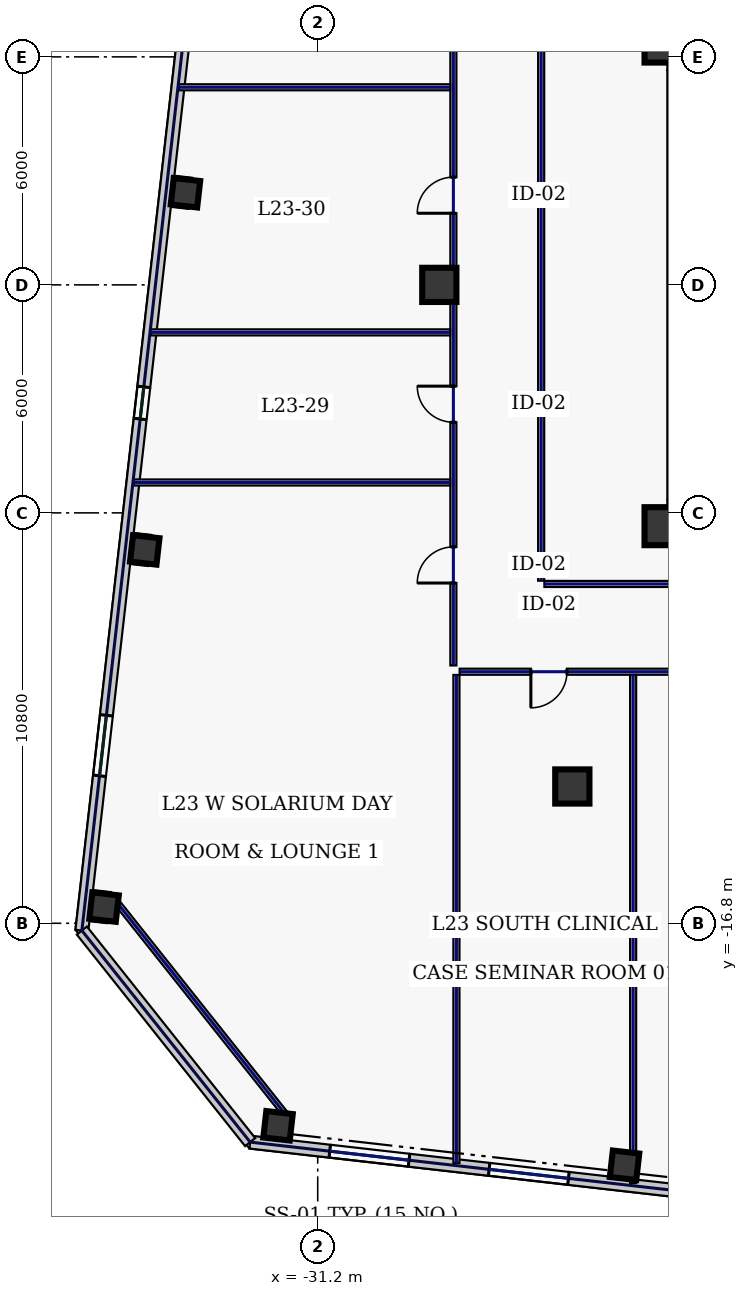
"""IFC4 building model, lengths in metres.
Left out: names, types, materials, properties, quantities, classifications, styles, units other than length and angle.
Written with IfcOpenShell. Run it as: python <this file> out.ifc"""

import sys

from ifc_helpers import new_model, si_unit, direction, frame, frame_2d, origin, origin_2d, place, context, subcontext, project, spatial, rectangle, hollow_rectangle, extrude, element, fill, save


model = new_model("IFC4")
c1 = context("Model", 3, precision=1e-05, world=origin(), true_north=direction((0.0, 1.0)))
c2 = subcontext(c1, "Body", "Model", "MODEL_VIEW")
j1 = project(units=[si_unit("LENGTHUNIT", "METRE"), si_unit("PLANEANGLEUNIT", "RADIAN")], contexts=[c1])
p1 = place(None, origin())
s1 = spatial("IfcSite", under=j1, at=p1, CompositionType="ELEMENT")
p2 = place(p1, origin())
s2 = spatial("IfcBuilding", under=s1, at=p2, CompositionType="ELEMENT")
p3 = place(p2, frame((0.0, 0.0, 105.4)))
s3 = spatial("IfcBuildingStorey", under=s2, at=p3, CompositionType="ELEMENT", Elevation=105.4)
for number, where, z_axis, x_axis in (
    (1, (-22.0, 6.0, 0.0), (0.0, 0.0, 1.0), (1.0, 0.0, 0.0)),
    (2, (-22.0, -6.0, 0.0), (0.0, 0.0, 1.0), (1.0, 0.0, 0.0)),
):
    element("IfcWall", number, at=place(p3, frame(where, z_axis=z_axis, x_axis=x_axis)), inside=s3, PredefinedType="SHEAR", context=c2, shape_type="SweptSolid", body=[
        extrude(rectangle(XDim=11.55, YDim=0.7, at=frame_2d((5.775, 0.0))), origin(), (0.0, 0.0, 1.0), 3.74),
    ])
p4 = place(p3, frame((-21.6, -5.65, 0.0), z_axis=(0.0, 0.0, 1.0), x_axis=(0.0, 1.0, 0.0)))
e3 = element("IfcWall", 3, at=p4, inside=s3, PredefinedType="SHEAR", context=c2, shape_type="SweptSolid", body=[
    extrude(rectangle(XDim=11.3, YDim=0.8, at=frame_2d((5.65, 0.0))), origin(), (0.0, 0.0, 1.0), 3.74),
])
for number, where, z_axis, x_axis in (
    (4, (-22.1, -6.35, 0.0), (0.0, 0.0, 1.0), (1.0, 0.0, 0.0)),
    (5, (-22.1, 6.35, 0.0), (0.0, 0.0, 1.0), (1.0, 0.0, 0.0)),
):
    element("IfcColumn", number, at=place(p3, frame(where, z_axis=z_axis, x_axis=x_axis)), inside=s3, PredefinedType="COLUMN", context=c2, shape_type="SweptSolid", body=[
        extrude(hollow_rectangle(XDim=1.0, YDim=1.0, WallThickness=0.045, at=origin_2d()), origin(), (0.0, 0.0, 1.0), 3.74),
    ])
for number, where, z_axis, x_axis in (
    (6, (-24.5, -13.2, 0.0), (0.0, 0.0, 1.0), (1.0, 0.0, 0.0)),
    (7, (-28.0, 0.0, 0.0), (0.0, 0.0, 1.0), (1.0, 0.0, 0.0)),
):
    element("IfcColumn", number, at=place(p3, frame(where, z_axis=z_axis, x_axis=x_axis)), inside=s3, PredefinedType="COLUMN", context=c2, shape_type="SweptSolid", body=[
        extrude(hollow_rectangle(XDim=0.9, YDim=0.9, WallThickness=0.04, at=origin_2d()), origin(), (0.0, 0.0, 1.0), 3.74),
    ])
for number, where, z_axis, x_axis in (
    (8, (-32.244, -22.129, 0.0), (0.0, 0.0, 1.0), (0.994, -0.113, 0.0)),
    (9, (-23.126, -23.168, 0.0), (0.0, 0.0, 1.0), (0.994, -0.113, 0.0)),
    (10, (-34.68, 2.425, 0.0), (0.0, 0.0, 1.0), (0.994, -0.113, 0.0)),
    (11, (-35.751, -6.974, 0.0), (0.0, 0.0, 1.0), (0.994, -0.113, 0.0)),
    (12, (-36.822, -16.374, 0.0), (0.0, 0.0, 1.0), (0.994, -0.113, 0.0)),
):
    element("IfcColumn", number, at=place(p3, frame(where, z_axis=z_axis, x_axis=x_axis)), inside=s3, PredefinedType="COLUMN", context=c2, shape_type="SweptSolid", body=[
        extrude(hollow_rectangle(XDim=0.7, YDim=0.7, WallThickness=0.032, at=origin_2d()), origin(), (0.0, 0.0, 1.0), 3.74),
    ])
p5 = place(p3, frame((-32.977, -22.559, 0.0), z_axis=(0.0, 0.0, 1.0), x_axis=(0.993571214605, -0.113208840243, 0.0)))
e13 = element("IfcWall", 13, at=p5, inside=s3, PredefinedType="STANDARD", context=c2, shape_type="SweptSolid", body=[
    extrude(rectangle(XDim=21.223, YDim=0.34, at=frame_2d((10.611, 0.0))), origin(), (0.0, 0.0, 1.0), 3.74),
])
p6 = place(p5, frame((2.108, 0.0, 0.67)))
e14 = element("IfcOpeningElement", 14, at=p6, cuts=e13, PredefinedType="OPENING", context=c2, shape_type="SweptSolid", body=[
    extrude(rectangle(XDim=2.1, YDim=2.2, at=frame_2d((1.05, 1.1))), frame((0.0, 0.18, 0.0), z_axis=(0.0, -1.0, 0.0), x_axis=(1.0, 0.0, 0.0)), (0.0, 0.0, 1.0), 0.36),
])
p7 = place(p5, frame((6.329, 0.0, 0.67)))
e15 = element("IfcOpeningElement", 15, at=p7, cuts=e13, PredefinedType="OPENING", context=c2, shape_type="SweptSolid", body=[
    extrude(rectangle(XDim=2.1, YDim=2.2, at=frame_2d((1.05, 1.1))), frame((0.0, 0.18, 0.0), z_axis=(0.0, -1.0, 0.0), x_axis=(1.0, 0.0, 0.0)), (0.0, 0.0, 1.0), 0.36),
])
p8 = place(p5, frame((11.285, 0.0, 0.67)))
e16 = element("IfcOpeningElement", 16, at=p8, cuts=e13, PredefinedType="OPENING", context=c2, shape_type="SweptSolid", body=[
    extrude(rectangle(XDim=2.1, YDim=2.2, at=frame_2d((1.05, 1.1))), frame((0.0, 0.18, 0.0), z_axis=(0.0, -1.0, 0.0), x_axis=(1.0, 0.0, 0.0)), (0.0, 0.0, 1.0), 0.36),
])
p9 = place(p5, frame((15.506, 0.0, 0.67)))
e17 = element("IfcOpeningElement", 17, at=p9, cuts=e13, PredefinedType="OPENING", context=c2, shape_type="SweptSolid", body=[
    extrude(rectangle(XDim=0.85, YDim=1.85, at=frame_2d((0.425, 0.925))), frame((0.0, 0.18, 0.0), z_axis=(0.0, -1.0, 0.0), x_axis=(1.0, 0.0, 0.0)), (0.0, 0.0, 1.0), 0.36),
])
p10 = place(p3, frame((-32.968, 21.957, 0.0), z_axis=(0.0, 0.0, 1.0), x_axis=(-0.113201605824, -0.993572038877, 0.0)))
e18 = element("IfcWall", 18, at=p10, inside=s3, PredefinedType="STANDARD", context=c2, shape_type="SweptSolid", body=[
    extrude(rectangle(XDim=39.2, YDim=0.34, at=frame_2d((19.6, 0.0))), origin(), (0.0, 0.0, 1.0), 3.74),
])
p11 = place(p10, frame((4.1, 0.0, 0.58)))
e19 = element("IfcOpeningElement", 19, at=p11, cuts=e18, PredefinedType="OPENING", context=c2, shape_type="SweptSolid", body=[
    extrude(rectangle(XDim=1.6, YDim=2.3, at=frame_2d((0.8, 1.15))), frame((0.0, 0.18, 0.0), z_axis=(0.0, -1.0, 0.0), x_axis=(1.0, 0.0, 0.0)), (0.0, 0.0, 1.0), 0.36),
])
p12 = place(p10, frame((13.9, 0.0, 0.58)))
e20 = element("IfcOpeningElement", 20, at=p12, cuts=e18, PredefinedType="OPENING", context=c2, shape_type="SweptSolid", body=[
    extrude(rectangle(XDim=1.6, YDim=2.3, at=frame_2d((0.8, 1.15))), frame((0.0, 0.18, 0.0), z_axis=(0.0, -1.0, 0.0), x_axis=(1.0, 0.0, 0.0)), (0.0, 0.0, 1.0), 0.36),
])
p13 = place(p10, frame((24.8, 0.0, 0.75)))
e21 = element("IfcOpeningElement", 21, at=p13, cuts=e18, PredefinedType="OPENING", context=c2, shape_type="SweptSolid", body=[
    extrude(rectangle(XDim=0.85, YDim=1.85, at=frame_2d((0.425, 0.925))), frame((0.0, 0.18, 0.0), z_axis=(0.0, -1.0, 0.0), x_axis=(1.0, 0.0, 0.0)), (0.0, 0.0, 1.0), 0.36),
])
p14 = place(p10, frame((33.5, 0.0, 0.58)))
e22 = element("IfcOpeningElement", 22, at=p14, cuts=e18, PredefinedType="OPENING", context=c2, shape_type="SweptSolid", body=[
    extrude(rectangle(XDim=1.6, YDim=2.3, at=frame_2d((0.8, 1.15))), frame((0.0, 0.18, 0.0), z_axis=(0.0, -1.0, 0.0), x_axis=(1.0, 0.0, 0.0)), (0.0, 0.0, 1.0), 0.36),
])
p15 = place(p3, frame((-37.406, -16.991, 0.0), z_axis=(0.0, 0.0, 1.0), x_axis=(0.622507800567, -0.78261359446, 0.0)))
e23 = element("IfcWall", 23, at=p15, inside=s3, PredefinedType="STANDARD", context=c2, shape_type="SweptSolid", body=[
    extrude(rectangle(XDim=7.114, YDim=0.34, at=frame_2d((3.557, 0.0))), origin(), (0.0, 0.0, 1.0), 3.74),
])
p16 = place(p3, frame((-36.556, -16.162, 0.0), z_axis=(0.0, 0.0, 1.0), x_axis=(0.622522641622, -0.782601789334, 0.0)))
e24 = element("IfcWall", 24, at=p16, inside=s3, PredefinedType="PARTITIONING", context=c2, shape_type="SweptSolid", body=[
    extrude(rectangle(XDim=7.354, YDim=0.16, at=frame_2d((3.677, 0.0))), origin(), (0.0, 0.0, 1.0), 3.74),
])
p17 = place(p3, frame((-27.63, -10.015, 0.0), z_axis=(0.0, 0.0, 1.0), x_axis=(0.0, 1.0, 0.0)))
e25 = element("IfcWall", 25, at=p17, inside=s3, PredefinedType="PARTITIONING", context=c2, shape_type="SweptSolid", body=[
    extrude(rectangle(XDim=20.13, YDim=0.16, at=frame_2d((10.065, 0.0))), origin(), (0.0, 0.0, 1.0), 3.74),
])
p18 = place(p17, frame((2.169, 0.0, 0.0)))
e26 = element("IfcOpeningElement", 26, at=p18, cuts=e25, PredefinedType="OPENING", context=c2, shape_type="SweptSolid", body=[
    extrude(rectangle(XDim=0.95, YDim=2.2, at=frame_2d((0.475, 1.1))), frame((0.0, 0.09, 0.0), z_axis=(0.0, -1.0, 0.0), x_axis=(1.0, 0.0, 0.0)), (0.0, 0.0, 1.0), 0.18),
])
p19 = place(p17, frame((6.4, 0.0, 0.0)))
e27 = element("IfcOpeningElement", 27, at=p19, cuts=e25, PredefinedType="OPENING", context=c2, shape_type="SweptSolid", body=[
    extrude(rectangle(XDim=0.95, YDim=2.2, at=frame_2d((0.475, 1.1))), frame((0.0, 0.09, 0.0), z_axis=(0.0, -1.0, 0.0), x_axis=(1.0, 0.0, 0.0)), (0.0, 0.0, 1.0), 0.18),
])
p20 = place(p17, frame((11.9, 0.0, 0.0)))
e28 = element("IfcOpeningElement", 28, at=p20, cuts=e25, PredefinedType="OPENING", context=c2, shape_type="SweptSolid", body=[
    extrude(rectangle(XDim=0.95, YDim=2.2, at=frame_2d((0.475, 1.1))), frame((0.0, 0.09, 0.0), z_axis=(0.0, -1.0, 0.0), x_axis=(1.0, 0.0, 0.0)), (0.0, 0.0, 1.0), 0.18),
])
p21 = place(p17, frame((17.131, 0.0, 0.0)))
e29 = element("IfcOpeningElement", 29, at=p21, cuts=e25, PredefinedType="OPENING", context=c2, shape_type="SweptSolid", body=[
    extrude(rectangle(XDim=0.95, YDim=2.2, at=frame_2d((0.475, 1.1))), frame((0.0, 0.09, 0.0), z_axis=(0.0, -1.0, 0.0), x_axis=(1.0, 0.0, 0.0)), (0.0, 0.0, 1.0), 0.18),
])
p22 = place(p3, frame((27.465, -10.18, 0.0), z_axis=(0.0, 0.0, 1.0), x_axis=(-1.0, 0.0, 0.0)))
e30 = element("IfcWall", 30, at=p22, inside=s3, PredefinedType="PARTITIONING", context=c2, shape_type="SweptSolid", body=[
    extrude(rectangle(XDim=54.93, YDim=0.16, at=frame_2d((27.465, 0.0))), origin(), (0.0, 0.0, 1.0), 3.74),
])
p23 = place(p22, frame((52.106, 0.0, 0.0)))
e31 = element("IfcOpeningElement", 31, at=p23, cuts=e30, PredefinedType="OPENING", context=c2, shape_type="SweptSolid", body=[
    extrude(rectangle(XDim=0.95, YDim=2.2, at=frame_2d((0.475, 1.1))), frame((0.0, 0.09, 0.0), z_axis=(0.0, -1.0, 0.0), x_axis=(1.0, 0.0, 0.0)), (0.0, 0.0, 1.0), 0.18),
])
p24 = place(p22, frame((46.575, 0.0, 0.0)))
e32 = element("IfcOpeningElement", 32, at=p24, cuts=e30, PredefinedType="OPENING", context=c2, shape_type="SweptSolid", body=[
    extrude(rectangle(XDim=1.15, YDim=2.2, at=frame_2d((0.575, 1.1))), frame((0.0, 0.09, 0.0), z_axis=(0.0, -1.0, 0.0), x_axis=(1.0, 0.0, 0.0)), (0.0, 0.0, 1.0), 0.18),
])
p25 = place(p22, frame((40.225, 0.0, 0.0)))
e33 = element("IfcOpeningElement", 33, at=p25, cuts=e30, PredefinedType="OPENING", context=c2, shape_type="SweptSolid", body=[
    extrude(rectangle(XDim=0.95, YDim=2.2, at=frame_2d((0.475, 1.1))), frame((0.0, 0.09, 0.0), z_axis=(0.0, -1.0, 0.0), x_axis=(1.0, 0.0, 0.0)), (0.0, 0.0, 1.0), 0.18),
])
p26 = place(p22, frame((33.425, 0.0, 0.0)))
e34 = element("IfcOpeningElement", 34, at=p26, cuts=e30, PredefinedType="OPENING", context=c2, shape_type="SweptSolid", body=[
    extrude(rectangle(XDim=1.3, YDim=2.2, at=frame_2d((0.65, 1.1))), frame((0.0, 0.09, 0.0), z_axis=(0.0, -1.0, 0.0), x_axis=(1.0, 0.0, 0.0)), (0.0, 0.0, 1.0), 0.18),
])
p27 = place(p22, frame((26.525, 0.0, 0.0)))
e35 = element("IfcOpeningElement", 35, at=p27, cuts=e30, PredefinedType="OPENING", context=c2, shape_type="SweptSolid", body=[
    extrude(rectangle(XDim=1.3, YDim=2.2, at=frame_2d((0.65, 1.1))), frame((0.0, 0.09, 0.0), z_axis=(0.0, -1.0, 0.0), x_axis=(1.0, 0.0, 0.0)), (0.0, 0.0, 1.0), 0.18),
])
p28 = place(p22, frame((19.875, 0.0, 0.0)))
e36 = element("IfcOpeningElement", 36, at=p28, cuts=e30, PredefinedType="OPENING", context=c2, shape_type="SweptSolid", body=[
    extrude(rectangle(XDim=1.3, YDim=2.2, at=frame_2d((0.65, 1.1))), frame((0.0, 0.09, 0.0), z_axis=(0.0, -1.0, 0.0), x_axis=(1.0, 0.0, 0.0)), (0.0, 0.0, 1.0), 0.18),
])
p29 = place(p22, frame((13.65, 0.0, 0.0)))
e37 = element("IfcOpeningElement", 37, at=p29, cuts=e30, PredefinedType="OPENING", context=c2, shape_type="SweptSolid", body=[
    extrude(rectangle(XDim=0.95, YDim=2.2, at=frame_2d((0.475, 1.1))), frame((0.0, 0.09, 0.0), z_axis=(0.0, -1.0, 0.0), x_axis=(1.0, 0.0, 0.0)), (0.0, 0.0, 1.0), 0.18),
])
p30 = place(p22, frame((7.425, 0.0, 0.0)))
e38 = element("IfcOpeningElement", 38, at=p30, cuts=e30, PredefinedType="OPENING", context=c2, shape_type="SweptSolid", body=[
    extrude(rectangle(XDim=0.95, YDim=2.2, at=frame_2d((0.475, 1.1))), frame((0.0, 0.09, 0.0), z_axis=(0.0, -1.0, 0.0), x_axis=(1.0, 0.0, 0.0)), (0.0, 0.0, 1.0), 0.18),
])
p31 = place(p22, frame((2.044, 0.0, 0.0)))
e39 = element("IfcOpeningElement", 39, at=p31, cuts=e30, PredefinedType="OPENING", context=c2, shape_type="SweptSolid", body=[
    extrude(rectangle(XDim=1.15, YDim=2.2, at=frame_2d((0.575, 1.1))), frame((0.0, 0.09, 0.0), z_axis=(0.0, -1.0, 0.0), x_axis=(1.0, 0.0, 0.0)), (0.0, 0.0, 1.0), 0.18),
])
p32 = place(p3, frame((-25.32, 7.885, 0.0), z_axis=(0.0, 0.0, 1.0), x_axis=(0.0, -1.0, 0.0)))
e40 = element("IfcWall", 40, at=p32, inside=s3, PredefinedType="PARTITIONING", context=c2, shape_type="SweptSolid", body=[
    extrude(rectangle(XDim=15.67, YDim=0.16, at=frame_2d((7.835, 0.0))), origin(), (0.0, 0.0, 1.0), 3.74),
])
p33 = place(p3, frame((-25.235, -7.87, 0.0), z_axis=(0.0, 0.0, 1.0), x_axis=(1.0, 0.0, 0.0)))
e41 = element("IfcWall", 41, at=p33, inside=s3, PredefinedType="PARTITIONING", context=c2, shape_type="SweptSolid", body=[
    extrude(rectangle(XDim=14.57, YDim=0.16, at=frame_2d((7.285, 0.0))), origin(), (0.0, 0.0, 1.0), 3.74),
])
p34 = place(p3, frame((-27.55, -23.106, 0.0), z_axis=(0.0, 0.0, 1.0), x_axis=(0.0, 1.0, 0.0)))
e42 = element("IfcWall", 42, at=p34, inside=s3, PredefinedType="PARTITIONING", context=c2, shape_type="SweptSolid", body=[
    extrude(rectangle(XDim=12.842, YDim=0.16, at=frame_2d((6.421, 0.0))), origin(), (0.0, 0.0, 1.0), 3.74),
])
p35 = place(p3, frame((-22.9, -23.636, 0.0), z_axis=(0.0, 0.0, 1.0), x_axis=(0.0, 1.0, 0.0)))
e43 = element("IfcWall", 43, at=p35, inside=s3, PredefinedType="PARTITIONING", context=c2, shape_type="SweptSolid", body=[
    extrude(rectangle(XDim=13.371, YDim=0.16, at=frame_2d((6.686, 0.0))), origin(), (0.0, 0.0, 1.0), 3.74),
])
p36 = place(p3, frame((-36.042, -5.2, 0.0), z_axis=(0.0, 0.0, 1.0), x_axis=(1.0, 0.0, 0.0)))
e44 = element("IfcWall", 44, at=p36, inside=s3, PredefinedType="PARTITIONING", context=c2, shape_type="SweptSolid", body=[
    extrude(rectangle(XDim=8.327, YDim=0.16, at=frame_2d((4.164, 0.0))), origin(), (0.0, 0.0, 1.0), 3.74),
])
p37 = place(p3, frame((-35.592, -1.25, 0.0), z_axis=(0.0, 0.0, 1.0), x_axis=(1.0, 0.0, 0.0)))
e45 = element("IfcWall", 45, at=p37, inside=s3, PredefinedType="PARTITIONING", context=c2, shape_type="SweptSolid", body=[
    extrude(rectangle(XDim=7.877, YDim=0.16, at=frame_2d((3.938, 0.0))), origin(), (0.0, 0.0, 1.0), 3.74),
])
p38 = place(p3, frame((-34.857, 5.2, 0.0), z_axis=(0.0, 0.0, 1.0), x_axis=(1.0, 0.0, 0.0)))
e46 = element("IfcWall", 46, at=p38, inside=s3, PredefinedType="PARTITIONING", context=c2, shape_type="SweptSolid", body=[
    extrude(rectangle(XDim=7.142, YDim=0.16, at=frame_2d((3.571, 0.0))), origin(), (0.0, 0.0, 1.0), 3.74),
])
p39 = place(p6, origin())
e47 = element("IfcWindow", 47, at=p39, inside=s3, PartitioningType="SINGLE_PANEL", PredefinedType="WINDOW", context=c2, shape_type="SweptSolid", body=[
    extrude(rectangle(XDim=2.1, YDim=2.2, at=frame_2d((1.05, 1.1))), frame((0.0, 0.03, 0.0), z_axis=(0.0, -1.0, 0.0), x_axis=(1.0, 0.0, 0.0)), (0.0, 0.0, 1.0), 0.06),
])
fill(e14, e47)
p40 = place(p7, origin())
e48 = element("IfcWindow", 48, at=p40, inside=s3, PartitioningType="SINGLE_PANEL", PredefinedType="WINDOW", context=c2, shape_type="SweptSolid", body=[
    extrude(rectangle(XDim=2.1, YDim=2.2, at=frame_2d((1.05, 1.1))), frame((0.0, 0.03, 0.0), z_axis=(0.0, -1.0, 0.0), x_axis=(1.0, 0.0, 0.0)), (0.0, 0.0, 1.0), 0.06),
])
fill(e15, e48)
p41 = place(p13, origin())
e49 = element("IfcWindow", 49, at=p41, inside=s3, PartitioningType="SINGLE_PANEL", PredefinedType="WINDOW", context=c2, shape_type="SweptSolid", body=[
    extrude(rectangle(XDim=0.85, YDim=1.85, at=frame_2d((0.425, 0.925))), frame((0.0, 0.03, 0.0), z_axis=(0.0, -1.0, 0.0), x_axis=(1.0, 0.0, 0.0)), (0.0, 0.0, 1.0), 0.06),
])
fill(e21, e49)
p42 = place(p14, origin())
e50 = element("IfcWindow", 50, at=p42, inside=s3, PartitioningType="SINGLE_PANEL", PredefinedType="WINDOW", context=c2, shape_type="SweptSolid", body=[
    extrude(rectangle(XDim=1.6, YDim=2.3, at=frame_2d((0.8, 1.15))), frame((0.0, 0.03, 0.0), z_axis=(0.0, -1.0, 0.0), x_axis=(1.0, 0.0, 0.0)), (0.0, 0.0, 1.0), 0.06),
])
fill(e22, e50)
p43 = place(p23, origin())
e51 = element("IfcDoor", 51, at=p43, inside=s3, OperationType="SINGLE_SWING_RIGHT", PredefinedType="DOOR", context=c2, shape_type="SweptSolid", body=[
    extrude(rectangle(XDim=0.95, YDim=2.2, at=frame_2d((0.475, 1.1))), frame((0.0, 0.025, 0.0), z_axis=(0.0, -1.0, 0.0), x_axis=(1.0, 0.0, 0.0)), (0.0, 0.0, 1.0), 0.05),
])
fill(e31, e51)
p44 = place(p18, origin())
e52 = element("IfcDoor", 52, at=p44, inside=s3, OperationType="SINGLE_SWING_LEFT", PredefinedType="DOOR", context=c2, shape_type="SweptSolid", body=[
    extrude(rectangle(XDim=0.95, YDim=2.2, at=frame_2d((0.475, 1.1))), frame((0.0, 0.025, 0.0), z_axis=(0.0, -1.0, 0.0), x_axis=(1.0, 0.0, 0.0)), (0.0, 0.0, 1.0), 0.05),
])
fill(e26, e52)
p45 = place(p19, origin())
e53 = element("IfcDoor", 53, at=p45, inside=s3, OperationType="SINGLE_SWING_RIGHT", PredefinedType="DOOR", context=c2, shape_type="SweptSolid", body=[
    extrude(rectangle(XDim=0.95, YDim=2.2, at=frame_2d((0.475, 1.1))), frame((0.0, 0.025, 0.0), z_axis=(0.0, -1.0, 0.0), x_axis=(1.0, 0.0, 0.0)), (0.0, 0.0, 1.0), 0.05),
])
fill(e27, e53)
p46 = place(p20, origin())
e54 = element("IfcDoor", 54, at=p46, inside=s3, OperationType="SINGLE_SWING_LEFT", PredefinedType="DOOR", context=c2, shape_type="SweptSolid", body=[
    extrude(rectangle(XDim=0.95, YDim=2.2, at=frame_2d((0.475, 1.1))), frame((0.0, 0.025, 0.0), z_axis=(0.0, -1.0, 0.0), x_axis=(1.0, 0.0, 0.0)), (0.0, 0.0, 1.0), 0.05),
])
fill(e28, e54)
save(model, sys.argv[1])
